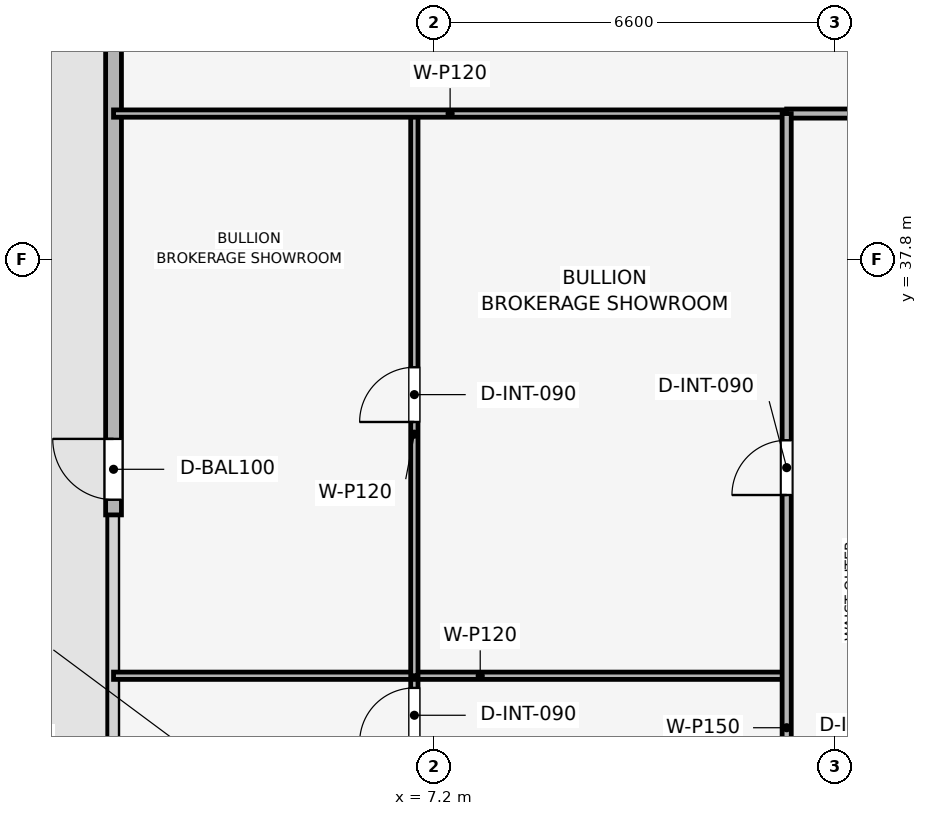
"""IFC4 building model, lengths in metres.
Left out: names, types, materials, properties, quantities, classifications, styles, units other than length and angle.
Written with IfcOpenShell. Run it as: python <this file> out.ifc"""

import sys

from ifc_helpers import new_model, si_unit, direction, frame, frame_2d, origin, place, context, subcontext, project, spatial, rectangle, extrude, element, fill, save


model = new_model("IFC4")
c1 = context("Model", 3, precision=1e-05, world=origin(), true_north=direction((0.0, 1.0)))
c2 = subcontext(c1, "Body", "Model", "MODEL_VIEW")
j1 = project(units=[si_unit("LENGTHUNIT", "METRE"), si_unit("PLANEANGLEUNIT", "RADIAN")], contexts=[c1])
p1 = place(None, origin())
s1 = spatial("IfcSite", under=j1, at=p1, CompositionType="ELEMENT")
p2 = place(p1, origin())
s2 = spatial("IfcBuilding", under=s1, at=p2, CompositionType="ELEMENT")
p3 = place(p2, frame((0.0, 0.0, 229.95)))
s3 = spatial("IfcBuildingStorey", under=s2, at=p3, CompositionType="ELEMENT", Elevation=229.95)
p4 = place(p3, frame((1.93, 33.6, 0.0), z_axis=(0.0, 0.0, 1.0), x_axis=(0.0, 1.0, 0.0)))
e1 = element("IfcWall", 1, at=p4, inside=s3, PredefinedType="SOLIDWALL", context=c2, shape_type="SweptSolid", body=[
    extrude(rectangle(XDim=14.7, YDim=0.26, at=frame_2d((7.35, 0.0))), origin(), (0.0, 0.0, 1.0), 3.5),
])
p5 = place(p4, frame((0.25, 0.0, 0.0)))
e2 = element("IfcOpeningElement", 2, at=p5, cuts=e1, PredefinedType="OPENING", context=c2, shape_type="SweptSolid", body=[
    extrude(rectangle(XDim=1.0, YDim=2.2, at=frame_2d((0.5, 1.1))), frame((0.0, 0.14, 0.0), z_axis=(0.0, -1.0, 0.0), x_axis=(1.0, 0.0, 0.0)), (0.0, 0.0, 1.0), 0.28),
])
p6 = place(p3, frame((6.877, 26.658, 0.0), z_axis=(0.0, 0.0, 1.0), x_axis=(0.0, 1.0, 0.0)))
e3 = element("IfcWall", 3, at=p6, inside=s3, PredefinedType="PARTITIONING", context=c2, shape_type="SweptSolid", body=[
    extrude(rectangle(XDim=4.297, YDim=0.12, at=frame_2d((2.148, 0.0))), origin(), (0.0, 0.0, 1.0), 3.035),
])
p7 = place(p6, frame((3.197, 0.0, 0.0)))
e4 = element("IfcOpeningElement", 4, at=p7, cuts=e3, PredefinedType="OPENING", context=c2, shape_type="SweptSolid", body=[
    extrude(rectangle(XDim=0.9, YDim=2.1, at=frame_2d((0.45, 1.05))), frame((0.0, 0.07, 0.0), z_axis=(0.0, -1.0, 0.0), x_axis=(1.0, 0.0, 0.0)), (0.0, 0.0, 1.0), 0.14),
])
p8 = place(p3, frame((1.93, 30.955, 0.0), z_axis=(0.0, 0.0, 1.0), x_axis=(1.0, 0.0, 0.0)))
e5 = element("IfcWall", 5, at=p8, inside=s3, PredefinedType="PARTITIONING", context=c2, shape_type="SweptSolid", body=[
    extrude(rectangle(XDim=11.07, YDim=0.12, at=frame_2d((5.535, 0.0))), origin(), (0.0, 0.0, 1.0), 2.885),
])
p9 = place(p3, frame((6.877, 30.955, 0.0), z_axis=(0.0, 0.0, 1.0), x_axis=(0.0, 1.0, 0.0)))
e6 = element("IfcWall", 6, at=p9, inside=s3, PredefinedType="PARTITIONING", context=c2, shape_type="SweptSolid", body=[
    extrude(rectangle(XDim=9.245, YDim=0.12, at=frame_2d((4.623, 0.0))), origin(), (0.0, 0.0, 1.0), 3.035),
])
p10 = place(p9, frame((4.173, 0.0, 0.0)))
e7 = element("IfcOpeningElement", 7, at=p10, cuts=e6, PredefinedType="OPENING", context=c2, shape_type="SweptSolid", body=[
    extrude(rectangle(XDim=0.9, YDim=2.1, at=frame_2d((0.45, 1.05))), frame((0.0, 0.07, 0.0), z_axis=(0.0, -1.0, 0.0), x_axis=(1.0, 0.0, 0.0)), (0.0, 0.0, 1.0), 0.14),
])
p11 = place(p3, frame((1.93, 40.2, 0.0), z_axis=(0.0, 0.0, 1.0), x_axis=(1.0, 0.0, 0.0)))
e8 = element("IfcWall", 8, at=p11, inside=s3, PredefinedType="PARTITIONING", context=c2, shape_type="SweptSolid", body=[
    extrude(rectangle(XDim=11.07, YDim=0.12, at=frame_2d((5.535, 0.0))), origin(), (0.0, 0.0, 1.0), 2.885),
])
p12 = place(p3, frame((13.0, 40.2, 0.0), z_axis=(0.0, 0.0, 1.0), x_axis=(1.0, 0.0, 0.0)))
e9 = element("IfcWall", 9, at=p12, inside=s3, PredefinedType="PARTITIONING", context=c2, shape_type="SweptSolid", body=[
    extrude(rectangle(XDim=31.6, YDim=0.15, at=frame_2d((15.8, 0.0))), origin(), (0.0, 0.0, 1.0), 3.035),
])
p13 = place(p12, frame((15.35, 0.0, 0.0)))
e10 = element("IfcOpeningElement", 10, at=p13, cuts=e9, PredefinedType="OPENING", context=c2, shape_type="SweptSolid", body=[
    extrude(rectangle(XDim=0.9, YDim=2.1, at=frame_2d((0.45, 1.05))), frame((0.0, 0.085, 0.0), z_axis=(0.0, -1.0, 0.0), x_axis=(1.0, 0.0, 0.0)), (0.0, 0.0, 1.0), 0.17),
])
p14 = place(p3, frame((13.0, 17.4, 0.0), z_axis=(0.0, 0.0, 1.0), x_axis=(0.0, 1.0, 0.0)))
e11 = element("IfcWall", 11, at=p14, inside=s3, PredefinedType="PARTITIONING", context=c2, shape_type="SweptSolid", body=[
    extrude(rectangle(XDim=22.8, YDim=0.15, at=frame_2d((11.4, 0.0))), origin(), (0.0, 0.0, 1.0), 3.035),
])
p15 = place(p14, frame((3.1, 0.0, 0.0)))
e12 = element("IfcOpeningElement", 12, at=p15, cuts=e11, PredefinedType="OPENING", context=c2, shape_type="SweptSolid", body=[
    extrude(rectangle(XDim=0.9, YDim=2.1, at=frame_2d((0.45, 1.05))), frame((0.0, 0.085, 0.0), z_axis=(0.0, -1.0, 0.0), x_axis=(1.0, 0.0, 0.0)), (0.0, 0.0, 1.0), 0.17),
])
p16 = place(p14, frame((6.529, 0.0, 0.0)))
e13 = element("IfcOpeningElement", 13, at=p16, cuts=e11, PredefinedType="OPENING", context=c2, shape_type="SweptSolid", body=[
    extrude(rectangle(XDim=0.9, YDim=2.1, at=frame_2d((0.45, 1.05))), frame((0.0, 0.085, 0.0), z_axis=(0.0, -1.0, 0.0), x_axis=(1.0, 0.0, 0.0)), (0.0, 0.0, 1.0), 0.17),
])
p17 = place(p14, frame((10.957, 0.0, 0.0)))
e14 = element("IfcOpeningElement", 14, at=p17, cuts=e11, PredefinedType="OPENING", context=c2, shape_type="SweptSolid", body=[
    extrude(rectangle(XDim=0.9, YDim=2.1, at=frame_2d((0.45, 1.05))), frame((0.0, 0.085, 0.0), z_axis=(0.0, -1.0, 0.0), x_axis=(1.0, 0.0, 0.0)), (0.0, 0.0, 1.0), 0.17),
])
p18 = place(p14, frame((16.527, 0.0, 0.0)))
e15 = element("IfcOpeningElement", 15, at=p18, cuts=e11, PredefinedType="OPENING", context=c2, shape_type="SweptSolid", body=[
    extrude(rectangle(XDim=0.9, YDim=2.1, at=frame_2d((0.45, 1.05))), frame((0.0, 0.085, 0.0), z_axis=(0.0, -1.0, 0.0), x_axis=(1.0, 0.0, 0.0)), (0.0, 0.0, 1.0), 0.17),
])
p19 = place(p5, origin())
e16 = element("IfcDoor", 16, at=p19, inside=s3, OperationType="SINGLE_SWING_RIGHT", PredefinedType="DOOR", context=c2, shape_type="SweptSolid", body=[
    extrude(rectangle(XDim=1.0, YDim=2.2, at=frame_2d((0.5, 1.1))), frame((0.0, 0.025, 0.0), z_axis=(0.0, -1.0, 0.0), x_axis=(1.0, 0.0, 0.0)), (0.0, 0.0, 1.0), 0.05),
])
fill(e2, e16)
p20 = place(p7, origin())
e17 = element("IfcDoor", 17, at=p20, inside=s3, OperationType="SINGLE_SWING_LEFT", PredefinedType="DOOR", context=c2, shape_type="SweptSolid", body=[
    extrude(rectangle(XDim=0.9, YDim=2.1, at=frame_2d((0.45, 1.05))), frame((0.0, 0.025, 0.0), z_axis=(0.0, -1.0, 0.0), x_axis=(1.0, 0.0, 0.0)), (0.0, 0.0, 1.0), 0.05),
])
fill(e4, e17)
p21 = place(p10, origin())
e18 = element("IfcDoor", 18, at=p21, inside=s3, OperationType="SINGLE_SWING_LEFT", PredefinedType="DOOR", context=c2, shape_type="SweptSolid", body=[
    extrude(rectangle(XDim=0.9, YDim=2.1, at=frame_2d((0.45, 1.05))), frame((0.0, 0.025, 0.0), z_axis=(0.0, -1.0, 0.0), x_axis=(1.0, 0.0, 0.0)), (0.0, 0.0, 1.0), 0.05),
])
fill(e7, e18)
p22 = place(p18, origin())
e19 = element("IfcDoor", 19, at=p22, inside=s3, OperationType="SINGLE_SWING_LEFT", PredefinedType="DOOR", context=c2, shape_type="SweptSolid", body=[
    extrude(rectangle(XDim=0.9, YDim=2.1, at=frame_2d((0.45, 1.05))), frame((0.0, 0.025, 0.0), z_axis=(0.0, -1.0, 0.0), x_axis=(1.0, 0.0, 0.0)), (0.0, 0.0, 1.0), 0.05),
])
fill(e15, e19)
save(model, sys.argv[1])
